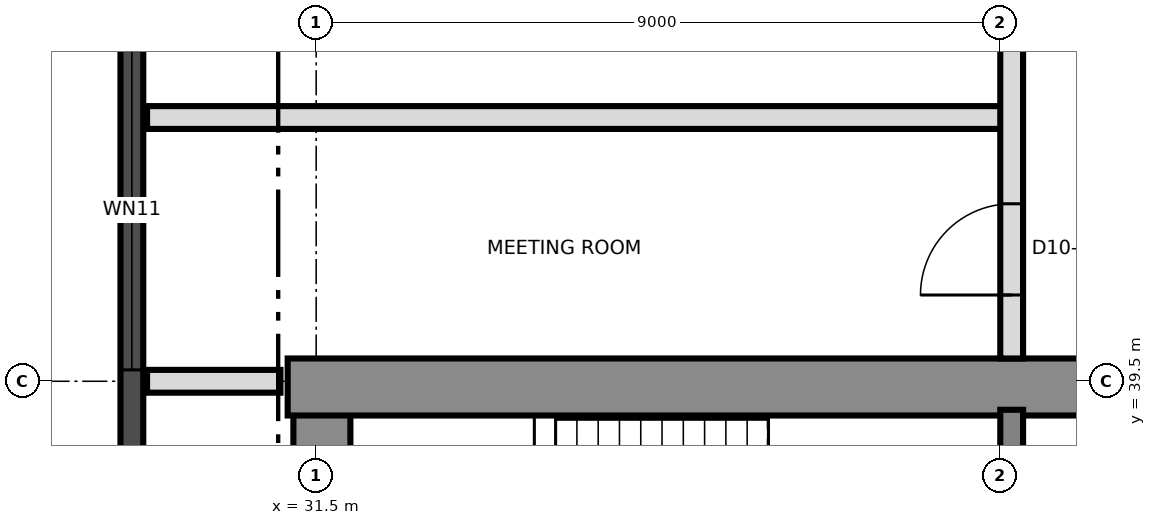
"""IFC4 building model, lengths in metres.
Left out: names, types, materials, properties, quantities, classifications, styles, units other than length and angle.
Written with IfcOpenShell. Run it as: python <this file> out.ifc"""

import sys

from ifc_helpers import new_model, si_unit, direction, frame, frame_2d, origin, place, context, subcontext, project, spatial, rectangle, extrude, element, fill, save


model = new_model("IFC4")
c1 = context("Model", 3, precision=1e-05, world=origin(), true_north=direction((0.0, 1.0)))
c2 = subcontext(c1, "Body", "Model", "MODEL_VIEW")
j1 = project(units=[si_unit("LENGTHUNIT", "METRE"), si_unit("PLANEANGLEUNIT", "RADIAN")], contexts=[c1])
p1 = place(None, origin())
s1 = spatial("IfcSite", under=j1, at=p1, CompositionType="ELEMENT")
p2 = place(p1, origin())
s2 = spatial("IfcBuilding", under=s1, at=p2, CompositionType="ELEMENT")
p3 = place(p2, frame((0.0, 0.0, 120.4)))
s3 = spatial("IfcBuildingStorey", under=s2, at=p3, CompositionType="ELEMENT", Elevation=120.4)
p4 = place(p3, frame((31.575, 21.875, 0.0), z_axis=(0.0, 0.0, 1.0), x_axis=(0.0, 1.0, 0.0)))
e1 = element("IfcWall", 1, at=p4, inside=s3, PredefinedType="SHEAR", context=c2, shape_type="SweptSolid", body=[
    extrude(rectangle(XDim=17.25, YDim=0.75, at=frame_2d((8.625, 0.0))), origin(), (0.0, 0.0, 1.0), 3.7),
])
p5 = place(p3, frame((31.125, 39.425, 0.0), z_axis=(0.0, 0.0, 1.0), x_axis=(1.0, 0.0, 0.0)))
e2 = element("IfcWall", 2, at=p5, inside=s3, PredefinedType="SHEAR", context=c2, shape_type="SweptSolid", body=[
    extrude(rectangle(XDim=27.0, YDim=0.75, at=frame_2d((13.5, 0.0))), origin(), (0.0, 0.0, 1.0), 3.7),
])
p6 = place(p5, frame((10.575, 0.0, 0.0)))
e3 = element("IfcOpeningElement", 3, at=p6, cuts=e2, PredefinedType="OPENING", context=c2, shape_type="SweptSolid", body=[
    extrude(rectangle(XDim=1.2, YDim=2.1, at=frame_2d((0.6, 1.05))), frame((0.0, 0.385, 0.0), z_axis=(0.0, -1.0, 0.0), x_axis=(1.0, 0.0, 0.0)), (0.0, 0.0, 1.0), 0.77),
])
p7 = place(p3, frame((40.65, 33.5, 0.0), z_axis=(0.0, 0.0, 1.0), x_axis=(0.0, 1.0, 0.0)))
e4 = element("IfcWall", 4, at=p7, inside=s3, PredefinedType="SHEAR", context=c2, shape_type="SweptSolid", body=[
    extrude(rectangle(XDim=5.625, YDim=0.3, at=frame_2d((2.812, 0.0))), origin(), (0.0, 0.0, 1.0), 3.7),
])
p8 = place(p3, frame((29.075, 66.986, 0.0), z_axis=(0.0, 0.0, 1.0), x_axis=(0.0, -1.0, 0.0)))
e5 = element("IfcWall", 5, at=p8, inside=s3, PredefinedType="SOLIDWALL", context=c2, shape_type="SweptSolid", body=[
    extrude(rectangle(XDim=32.976, YDim=0.3, at=frame_2d((16.488, 0.0))), origin(), (0.0, 0.0, 1.0), 3.4),
])
p9 = place(p8, frame((1.593, 0.0, 0.3)))
e6 = element("IfcOpeningElement", 6, at=p9, cuts=e5, PredefinedType="OPENING", context=c2, shape_type="SweptSolid", body=[
    extrude(rectangle(XDim=1.8, YDim=2.4, at=frame_2d((0.9, 1.2))), frame((0.0, 0.16, 0.0), z_axis=(0.0, -1.0, 0.0), x_axis=(1.0, 0.0, 0.0)), (0.0, 0.0, 1.0), 0.32),
])
p10 = place(p8, frame((5.136, 0.0, 0.9)))
e7 = element("IfcOpeningElement", 7, at=p10, cuts=e5, PredefinedType="OPENING", context=c2, shape_type="SweptSolid", body=[
    extrude(rectangle(XDim=4.2, YDim=1.5, at=frame_2d((2.1, 0.75))), frame((0.0, 0.16, 0.0), z_axis=(0.0, -1.0, 0.0), x_axis=(1.0, 0.0, 0.0)), (0.0, 0.0, 1.0), 0.32),
])
p11 = place(p8, frame((9.636, 0.0, 0.9)))
e8 = element("IfcOpeningElement", 8, at=p11, cuts=e5, PredefinedType="OPENING", context=c2, shape_type="SweptSolid", body=[
    extrude(rectangle(XDim=4.2, YDim=1.5, at=frame_2d((2.1, 0.75))), frame((0.0, 0.16, 0.0), z_axis=(0.0, -1.0, 0.0), x_axis=(1.0, 0.0, 0.0)), (0.0, 0.0, 1.0), 0.32),
])
p12 = place(p8, frame((14.136, 0.0, 0.9)))
e9 = element("IfcOpeningElement", 9, at=p12, cuts=e5, PredefinedType="OPENING", context=c2, shape_type="SweptSolid", body=[
    extrude(rectangle(XDim=4.2, YDim=1.5, at=frame_2d((2.1, 0.75))), frame((0.0, 0.16, 0.0), z_axis=(0.0, -1.0, 0.0), x_axis=(1.0, 0.0, 0.0)), (0.0, 0.0, 1.0), 0.32),
])
p13 = place(p8, frame((18.636, 0.0, 0.9)))
e10 = element("IfcOpeningElement", 10, at=p13, cuts=e5, PredefinedType="OPENING", context=c2, shape_type="SweptSolid", body=[
    extrude(rectangle(XDim=4.2, YDim=1.5, at=frame_2d((2.1, 0.75))), frame((0.0, 0.16, 0.0), z_axis=(0.0, -1.0, 0.0), x_axis=(1.0, 0.0, 0.0)), (0.0, 0.0, 1.0), 0.32),
])
p14 = place(p8, frame((23.136, 0.0, 0.9)))
e11 = element("IfcOpeningElement", 11, at=p14, cuts=e5, PredefinedType="OPENING", context=c2, shape_type="SweptSolid", body=[
    extrude(rectangle(XDim=4.2, YDim=1.5, at=frame_2d((2.1, 0.75))), frame((0.0, 0.16, 0.0), z_axis=(0.0, -1.0, 0.0), x_axis=(1.0, 0.0, 0.0)), (0.0, 0.0, 1.0), 0.32),
])
p15 = place(p8, frame((29.331, 0.0, 0.3)))
e12 = element("IfcOpeningElement", 12, at=p15, cuts=e5, PredefinedType="OPENING", context=c2, shape_type="SweptSolid", body=[
    extrude(rectangle(XDim=1.8, YDim=2.4, at=frame_2d((0.9, 1.2))), frame((0.0, 0.16, 0.0), z_axis=(0.0, -1.0, 0.0), x_axis=(1.0, 0.0, 0.0)), (0.0, 0.0, 1.0), 0.32),
])
p16 = place(p3, frame((29.275, 39.5, 0.0), z_axis=(0.0, 0.0, 1.0), x_axis=(1.0, 0.0, 0.0)))
e13 = element("IfcWall", 13, at=p16, inside=s3, PredefinedType="PARTITIONING", context=c2, shape_type="SweptSolid", body=[
    extrude(rectangle(XDim=1.755, YDim=0.3, at=frame_2d((0.877, 0.0))), origin(), (0.0, 0.0, 1.0), 3.35),
])
p17 = place(p3, frame((29.275, 42.97, 0.0), z_axis=(0.0, 0.0, 1.0), x_axis=(1.0, 0.0, 0.0)))
e14 = element("IfcWall", 14, at=p17, inside=s3, PredefinedType="PARTITIONING", context=c2, shape_type="SweptSolid", body=[
    extrude(rectangle(XDim=11.375, YDim=0.3, at=frame_2d((5.688, 0.0))), origin(), (0.0, 0.0, 1.0), 3.35),
])
p18 = place(p3, frame((40.65, 39.8, 0.0), z_axis=(0.0, 0.0, 1.0), x_axis=(0.0, 1.0, 0.0)))
e15 = element("IfcWall", 15, at=p18, inside=s3, PredefinedType="PARTITIONING", context=c2, shape_type="SweptSolid", body=[
    extrude(rectangle(XDim=37.2, YDim=0.3, at=frame_2d((18.6, 0.0))), origin(), (0.0, 0.0, 1.0), 3.35),
])
p19 = place(p18, frame((0.835, 0.0, 0.0)))
e16 = element("IfcOpeningElement", 16, at=p19, cuts=e15, PredefinedType="OPENING", context=c2, shape_type="SweptSolid", body=[
    extrude(rectangle(XDim=1.2, YDim=2.1, at=frame_2d((0.6, 1.05))), frame((0.0, 0.16, 0.0), z_axis=(0.0, -1.0, 0.0), x_axis=(1.0, 0.0, 0.0)), (0.0, 0.0, 1.0), 0.32),
])
p20 = place(p18, frame((4.085, 0.0, 0.0)))
e17 = element("IfcOpeningElement", 17, at=p20, cuts=e15, PredefinedType="OPENING", context=c2, shape_type="SweptSolid", body=[
    extrude(rectangle(XDim=1.0, YDim=2.1, at=frame_2d((0.5, 1.05))), frame((0.0, 0.16, 0.0), z_axis=(0.0, -1.0, 0.0), x_axis=(1.0, 0.0, 0.0)), (0.0, 0.0, 1.0), 0.32),
])
p21 = place(p18, frame((9.835, 0.0, 0.0)))
e18 = element("IfcOpeningElement", 18, at=p21, cuts=e15, PredefinedType="OPENING", context=c2, shape_type="SweptSolid", body=[
    extrude(rectangle(XDim=1.2, YDim=2.1, at=frame_2d((0.6, 1.05))), frame((0.0, 0.16, 0.0), z_axis=(0.0, -1.0, 0.0), x_axis=(1.0, 0.0, 0.0)), (0.0, 0.0, 1.0), 0.32),
])
p22 = place(p18, frame((13.085, 0.0, 0.0)))
e19 = element("IfcOpeningElement", 19, at=p22, cuts=e15, PredefinedType="OPENING", context=c2, shape_type="SweptSolid", body=[
    extrude(rectangle(XDim=1.0, YDim=2.1, at=frame_2d((0.5, 1.05))), frame((0.0, 0.16, 0.0), z_axis=(0.0, -1.0, 0.0), x_axis=(1.0, 0.0, 0.0)), (0.0, 0.0, 1.0), 0.32),
])
p23 = place(p18, frame((21.2, 0.0, 0.0)))
e20 = element("IfcOpeningElement", 20, at=p23, cuts=e15, PredefinedType="OPENING", context=c2, shape_type="SweptSolid", body=[
    extrude(rectangle(XDim=1.0, YDim=2.4, at=frame_2d((0.5, 1.2))), frame((0.0, 0.16, 0.0), z_axis=(0.0, -1.0, 0.0), x_axis=(1.0, 0.0, 0.0)), (0.0, 0.0, 1.0), 0.32),
])
p24 = place(p14, origin())
e21 = element("IfcWindow", 21, at=p24, inside=s3, PartitioningType="SINGLE_PANEL", PredefinedType="WINDOW", context=c2, shape_type="SweptSolid", body=[
    extrude(rectangle(XDim=4.2, YDim=1.5, at=frame_2d((2.1, 0.75))), frame((0.0, 0.03, 0.0), z_axis=(0.0, -1.0, 0.0), x_axis=(1.0, 0.0, 0.0)), (0.0, 0.0, 1.0), 0.06),
])
fill(e11, e21)
p25 = place(p19, origin())
e22 = element("IfcDoor", 22, at=p25, inside=s3, OperationType="SINGLE_SWING_LEFT", PredefinedType="DOOR", context=c2, shape_type="SweptSolid", body=[
    extrude(rectangle(XDim=1.2, YDim=2.1, at=frame_2d((0.6, 1.05))), frame((0.0, 0.025, 0.0), z_axis=(0.0, -1.0, 0.0), x_axis=(1.0, 0.0, 0.0)), (0.0, 0.0, 1.0), 0.05),
])
fill(e16, e22)
save(model, sys.argv[1])
